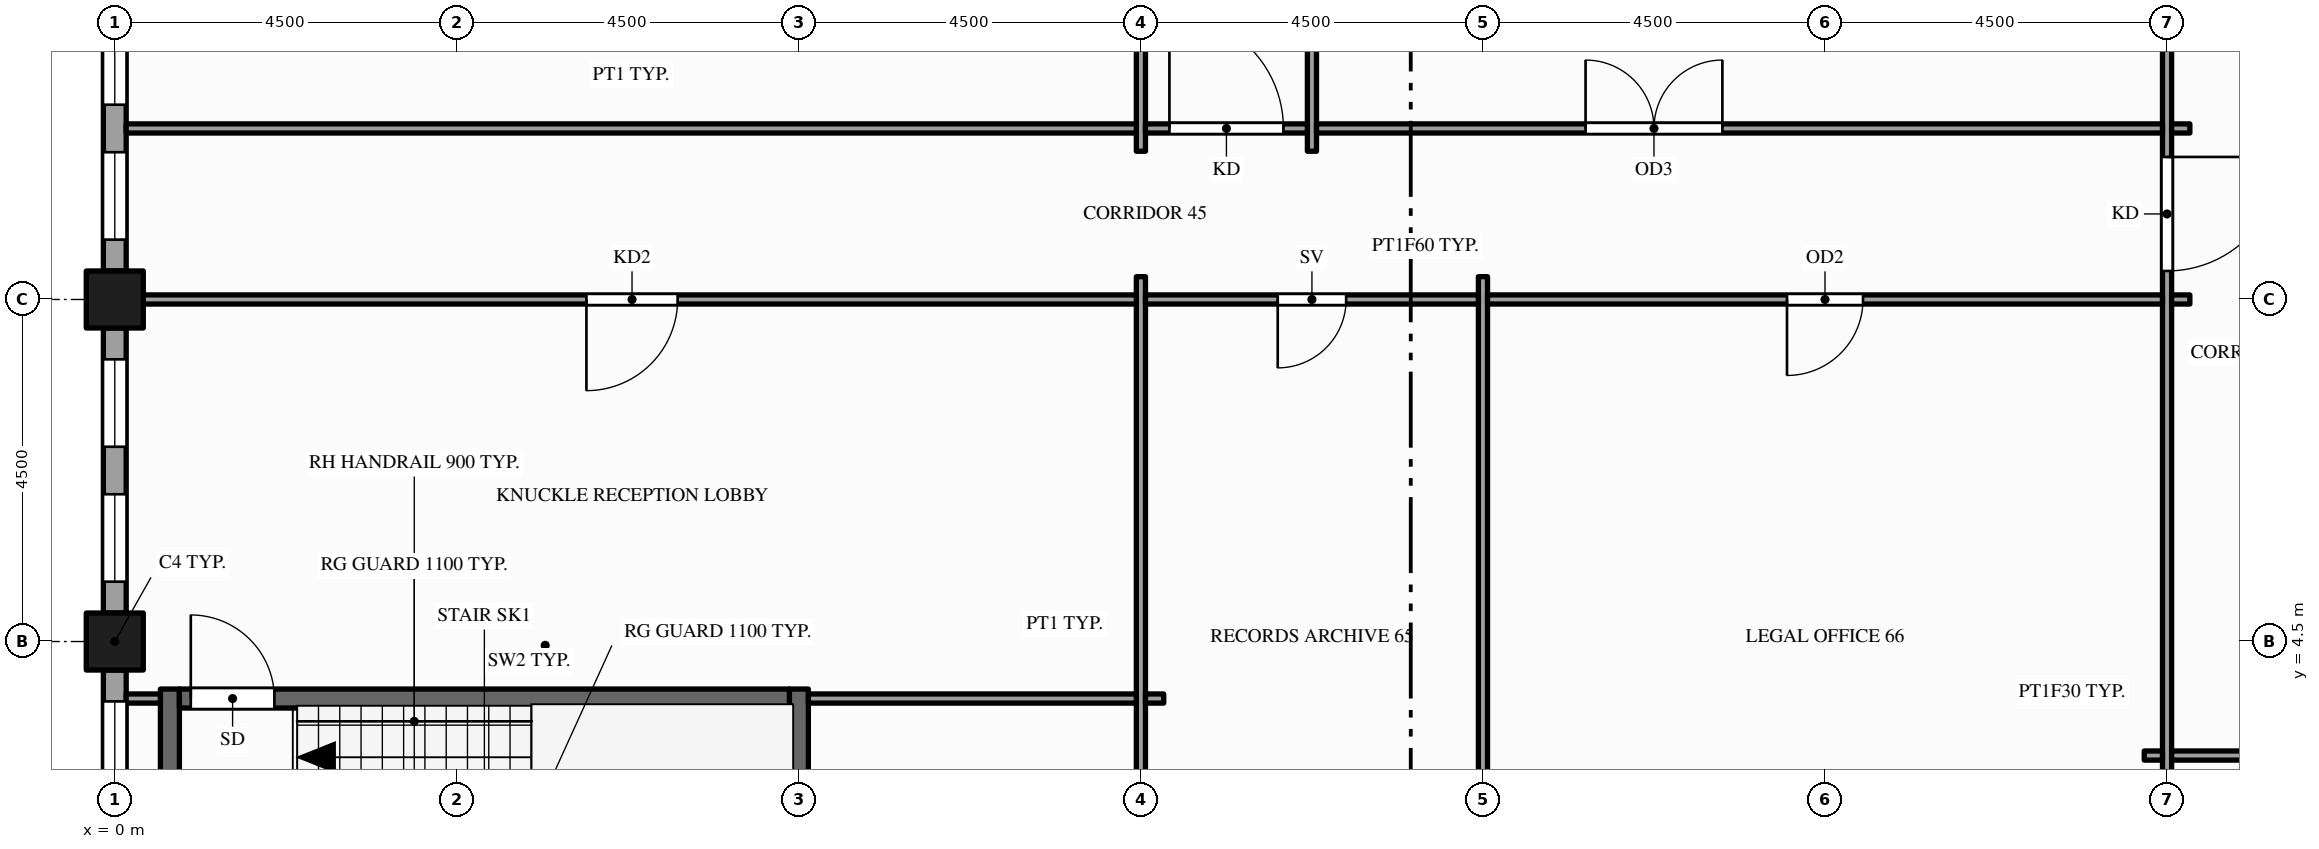
"""IFC4 building model, lengths in metres.
Left out: names, types, materials, properties, quantities, classifications, styles, units other than length and angle.
Written with IfcOpenShell. Run it as: python <this file> out.ifc"""

import sys

from ifc_helpers import new_model, si_unit, direction, frame, frame_2d, origin, origin_2d, place, context, subcontext, project, spatial, rectangle, hollow_rectangle, extrude, element, fill, save


model = new_model("IFC4")
c1 = context("Model", 3, precision=1e-05, world=origin(), true_north=direction((0.0, 1.0)))
c2 = subcontext(c1, "Body", "Model", "MODEL_VIEW")
j1 = project(units=[si_unit("LENGTHUNIT", "METRE"), si_unit("PLANEANGLEUNIT", "RADIAN")], contexts=[c1])
p1 = place(None, origin())
s1 = spatial("IfcSite", under=j1, at=p1, CompositionType="ELEMENT")
p2 = place(p1, origin())
s2 = spatial("IfcBuilding", under=s1, at=p2, CompositionType="ELEMENT")
p3 = place(p2, frame((0.0, 0.0, 227.0)))
s3 = spatial("IfcBuildingStorey", under=s2, at=p3, CompositionType="ELEMENT", Elevation=227.0)
for number, where, z_axis, x_axis in (
    (1, (0.0, 4.5, -0.15), (0.0, 0.0, 1.0), (1.0, 0.0, 0.0)),
    (2, (0.0, 9.0, -0.15), (0.0, 0.0, 1.0), (1.0, 0.0, 0.0)),
):
    element("IfcColumn", number, at=place(p3, frame(where, z_axis=z_axis, x_axis=x_axis)), inside=s3, PredefinedType="COLUMN", context=c2, shape_type="SweptSolid", body=[
        extrude(hollow_rectangle(XDim=0.75, YDim=0.75, WallThickness=0.036, at=origin_2d()), origin(), (0.0, 0.0, 1.0), 4.0),
    ])
p4 = place(p3, frame((0.0, 13.125, 0.0), z_axis=(0.0, 0.0, 1.0), x_axis=(0.0, -1.0, 0.0)))
e3 = element("IfcWall", 3, at=p4, inside=s3, PredefinedType="STANDARD", context=c2, shape_type="SweptSolid", body=[
    extrude(rectangle(XDim=3.75, YDim=0.3, at=frame_2d((1.875, 0.0))), origin(), (0.0, 0.0, 1.0), 3.157),
])
p5 = place(p4, frame((0.413, 0.0, 0.9)))
e4 = element("IfcOpeningElement", 4, at=p5, cuts=e3, PredefinedType="OPENING", context=c2, shape_type="SweptSolid", body=[
    extrude(rectangle(XDim=1.15, YDim=2.0, at=frame_2d((0.575, 1.0))), frame((0.0, 0.16, 0.0), z_axis=(0.0, -1.0, 0.0), x_axis=(1.0, 0.0, 0.0)), (0.0, 0.0, 1.0), 0.32),
])
p6 = place(p4, frame((2.188, 0.0, 0.9)))
e5 = element("IfcOpeningElement", 5, at=p6, cuts=e3, PredefinedType="OPENING", context=c2, shape_type="SweptSolid", body=[
    extrude(rectangle(XDim=1.15, YDim=2.0, at=frame_2d((0.575, 1.0))), frame((0.0, 0.16, 0.0), z_axis=(0.0, -1.0, 0.0), x_axis=(1.0, 0.0, 0.0)), (0.0, 0.0, 1.0), 0.32),
])
p7 = place(p3, frame((0.0, 8.625, 0.0), z_axis=(0.0, 0.0, 1.0), x_axis=(0.0, -1.0, 0.0)))
e6 = element("IfcWall", 6, at=p7, inside=s3, PredefinedType="STANDARD", context=c2, shape_type="SweptSolid", body=[
    extrude(rectangle(XDim=3.75, YDim=0.3, at=frame_2d((1.875, 0.0))), origin(), (0.0, 0.0, 1.0), 3.157),
])
p8 = place(p7, frame((0.413, 0.0, 0.9)))
e7 = element("IfcOpeningElement", 7, at=p8, cuts=e6, PredefinedType="OPENING", context=c2, shape_type="SweptSolid", body=[
    extrude(rectangle(XDim=1.15, YDim=2.0, at=frame_2d((0.575, 1.0))), frame((0.0, 0.16, 0.0), z_axis=(0.0, -1.0, 0.0), x_axis=(1.0, 0.0, 0.0)), (0.0, 0.0, 1.0), 0.32),
])
p9 = place(p7, frame((2.188, 0.0, 0.9)))
e8 = element("IfcOpeningElement", 8, at=p9, cuts=e6, PredefinedType="OPENING", context=c2, shape_type="SweptSolid", body=[
    extrude(rectangle(XDim=1.15, YDim=2.0, at=frame_2d((0.575, 1.0))), frame((0.0, 0.16, 0.0), z_axis=(0.0, -1.0, 0.0), x_axis=(1.0, 0.0, 0.0)), (0.0, 0.0, 1.0), 0.32),
])
p10 = place(p3, frame((0.0, 4.125, 0.0), z_axis=(0.0, 0.0, 1.0), x_axis=(0.0, -1.0, 0.0)))
e9 = element("IfcWall", 9, at=p10, inside=s3, PredefinedType="STANDARD", context=c2, shape_type="SweptSolid", body=[
    extrude(rectangle(XDim=3.75, YDim=0.3, at=frame_2d((1.875, 0.0))), origin(), (0.0, 0.0, 1.0), 3.157),
])
p11 = place(p10, frame((0.413, 0.0, 0.9)))
e10 = element("IfcOpeningElement", 10, at=p11, cuts=e9, PredefinedType="OPENING", context=c2, shape_type="SweptSolid", body=[
    extrude(rectangle(XDim=1.15, YDim=2.0, at=frame_2d((0.575, 1.0))), frame((0.0, 0.16, 0.0), z_axis=(0.0, -1.0, 0.0), x_axis=(1.0, 0.0, 0.0)), (0.0, 0.0, 1.0), 0.32),
])
p12 = place(p10, frame((2.188, 0.0, 0.9)))
e11 = element("IfcOpeningElement", 11, at=p12, cuts=e9, PredefinedType="OPENING", context=c2, shape_type="SweptSolid", body=[
    extrude(rectangle(XDim=1.15, YDim=2.0, at=frame_2d((0.575, 1.0))), frame((0.0, 0.16, 0.0), z_axis=(0.0, -1.0, 0.0), x_axis=(1.0, 0.0, 0.0)), (0.0, 0.0, 1.0), 0.32),
])
p13 = place(p3, frame((0.725, 0.6, 0.0), z_axis=(0.0, 0.0, 1.0), x_axis=(0.0, 1.0, 0.0)))
e12 = element("IfcWall", 12, at=p13, inside=s3, PredefinedType="SHEAR", context=c2, shape_type="SweptSolid", body=[
    extrude(rectangle(XDim=3.275, YDim=0.25, at=frame_2d((1.637, 0.0))), origin(), (0.0, 0.0, 1.0), 3.85),
])
p14 = place(p3, frame((9.0, 0.375, 0.0), z_axis=(0.0, 0.0, 1.0), x_axis=(0.0, 1.0, 0.0)))
e13 = element("IfcWall", 13, at=p14, inside=s3, PredefinedType="SHEAR", context=c2, shape_type="SweptSolid", body=[
    extrude(rectangle(XDim=3.5, YDim=0.25, at=frame_2d((1.75, 0.0))), origin(), (0.0, 0.0, 1.0), 3.85),
])
p15 = place(p3, frame((13.5, 0.15, 0.0), z_axis=(0.0, 0.0, 1.0), x_axis=(0.0, 1.0, 0.0)))
e14 = element("IfcWall", 14, at=p15, inside=s3, PredefinedType="PARTITIONING", context=c2, shape_type="SweptSolid", body=[
    extrude(rectangle(XDim=9.15, YDim=0.12, at=frame_2d((4.575, 0.0))), origin(), (0.0, 0.0, 1.0), 2.87),
])
p16 = place(p3, frame((13.5, 10.95, 0.0), z_axis=(0.0, 0.0, 1.0), x_axis=(0.0, 1.0, 0.0)))
e15 = element("IfcWall", 15, at=p16, inside=s3, PredefinedType="PARTITIONING", context=c2, shape_type="SweptSolid", body=[
    extrude(rectangle(XDim=20.85, YDim=0.12, at=frame_2d((10.425, 0.0))), origin(), (0.0, 0.0, 1.0), 2.6),
])
p17 = place(p16, frame((3.175, 0.0, 0.0)))
e16 = element("IfcOpeningElement", 16, at=p17, cuts=e15, PredefinedType="OPENING", context=c2, shape_type="SweptSolid", body=[
    extrude(rectangle(XDim=1.0, YDim=2.1, at=frame_2d((0.5, 1.05))), frame((0.0, 0.07, 0.0), z_axis=(0.0, -1.0, 0.0), x_axis=(1.0, 0.0, 0.0)), (0.0, 0.0, 1.0), 0.14),
])
p18 = place(p16, frame((11.08, 0.0, 0.0)))
e17 = element("IfcOpeningElement", 17, at=p18, cuts=e15, PredefinedType="OPENING", context=c2, shape_type="SweptSolid", body=[
    extrude(rectangle(XDim=1.0, YDim=2.1, at=frame_2d((0.5, 1.05))), frame((0.0, 0.07, 0.0), z_axis=(0.0, -1.0, 0.0), x_axis=(1.0, 0.0, 0.0)), (0.0, 0.0, 1.0), 0.14),
])
p19 = place(p3, frame((15.75, 10.95, 0.0), z_axis=(0.0, 0.0, 1.0), x_axis=(0.0, 1.0, 0.0)))
e18 = element("IfcWall", 18, at=p19, inside=s3, PredefinedType="PARTITIONING", context=c2, shape_type="SweptSolid", body=[
    extrude(rectangle(XDim=20.85, YDim=0.12, at=frame_2d((10.425, 0.0))), origin(), (0.0, 0.0, 1.0), 2.6),
])
p20 = place(p19, frame((17.8, 0.0, 0.0)))
e19 = element("IfcOpeningElement", 19, at=p20, cuts=e18, PredefinedType="OPENING", context=c2, shape_type="SweptSolid", body=[
    extrude(rectangle(XDim=1.0, YDim=2.1, at=frame_2d((0.5, 1.05))), frame((0.0, 0.07, 0.0), z_axis=(0.0, -1.0, 0.0), x_axis=(1.0, 0.0, 0.0)), (0.0, 0.0, 1.0), 0.14),
])
p21 = place(p19, frame((4.2, 0.0, 0.0)))
e20 = element("IfcOpeningElement", 20, at=p21, cuts=e18, PredefinedType="OPENING", context=c2, shape_type="SweptSolid", body=[
    extrude(rectangle(XDim=1.2, YDim=2.1, at=frame_2d((0.6, 1.05))), frame((0.0, 0.07, 0.0), z_axis=(0.0, -1.0, 0.0), x_axis=(1.0, 0.0, 0.0)), (0.0, 0.0, 1.0), 0.14),
])
p22 = place(p3, frame((18.0, 0.15, 0.0), z_axis=(0.0, 0.0, 1.0), x_axis=(0.0, 1.0, 0.0)))
e21 = element("IfcWall", 21, at=p22, inside=s3, PredefinedType="PARTITIONING", context=c2, shape_type="SweptSolid", body=[
    extrude(rectangle(XDim=9.15, YDim=0.12, at=frame_2d((4.575, 0.0))), origin(), (0.0, 0.0, 1.0), 2.87),
])
p23 = place(p3, frame((27.0, -1.35, 0.0), z_axis=(0.0, 0.0, 1.0), x_axis=(0.0, 1.0, 0.0)))
e22 = element("IfcWall", 22, at=p23, inside=s3, PredefinedType="PARTITIONING", context=c2, shape_type="SweptSolid", body=[
    extrude(rectangle(XDim=22.48, YDim=0.12, at=frame_2d((11.24, 0.0))), origin(), (0.0, 0.0, 1.0), 2.87),
])
p24 = place(p23, frame((10.725, 0.0, 0.0)))
e23 = element("IfcOpeningElement", 23, at=p24, cuts=e22, PredefinedType="OPENING", context=c2, shape_type="SweptSolid", body=[
    extrude(rectangle(XDim=1.5, YDim=2.1, at=frame_2d((0.75, 1.05))), frame((0.0, 0.07, 0.0), z_axis=(0.0, -1.0, 0.0), x_axis=(1.0, 0.0, 0.0)), (0.0, 0.0, 1.0), 0.14),
])
p25 = place(p23, frame((14.625, 0.0, 0.0)))
e24 = element("IfcOpeningElement", 24, at=p25, cuts=e22, PredefinedType="OPENING", context=c2, shape_type="SweptSolid", body=[
    extrude(rectangle(XDim=1.2, YDim=2.1, at=frame_2d((0.6, 1.05))), frame((0.0, 0.07, 0.0), z_axis=(0.0, -1.0, 0.0), x_axis=(1.0, 0.0, 0.0)), (0.0, 0.0, 1.0), 0.14),
])
p26 = place(p3, frame((26.7, 3.0, 0.0), z_axis=(0.0, 0.0, 1.0), x_axis=(1.0, 0.0, 0.0)))
e25 = element("IfcWall", 25, at=p26, inside=s3, PredefinedType="PARTITIONING", context=c2, shape_type="SweptSolid", body=[
    extrude(rectangle(XDim=0.24, YDim=0.12, at=frame_2d((0.12, 0.0))), origin(), (0.0, 0.0, 1.0), 2.87),
])
p27 = place(p3, frame((27.06, 3.0, 0.0), z_axis=(0.0, 0.0, 1.0), x_axis=(1.0, 0.0, 0.0)))
e26 = element("IfcWall", 26, at=p27, inside=s3, PredefinedType="PARTITIONING", context=c2, shape_type="SweptSolid", body=[
    extrude(rectangle(XDim=2.13, YDim=0.12, at=frame_2d((1.065, 0.0))), origin(), (0.0, 0.0, 1.0), 2.87),
])
p28 = place(p3, frame((0.15, 3.75, 0.0), z_axis=(0.0, 0.0, 1.0), x_axis=(1.0, 0.0, 0.0)))
e27 = element("IfcWall", 27, at=p28, inside=s3, PredefinedType="PARTITIONING", context=c2, shape_type="SweptSolid", body=[
    extrude(rectangle(XDim=0.45, YDim=0.12, at=frame_2d((0.225, 0.0))), origin(), (0.0, 0.0, 1.0), 3.85),
])
p29 = place(p3, frame((0.85, 3.75, 0.0), z_axis=(0.0, 0.0, 1.0), x_axis=(1.0, 0.0, 0.0)))
e28 = element("IfcWall", 28, at=p29, inside=s3, PredefinedType="SHEAR", context=c2, shape_type="SweptSolid", body=[
    extrude(rectangle(XDim=8.025, YDim=0.25, at=frame_2d((4.012, 0.0))), origin(), (0.0, 0.0, 1.0), 3.85),
])
p30 = place(p29, frame((0.15, 0.0, 0.0)))
e29 = element("IfcOpeningElement", 29, at=p30, cuts=e28, PredefinedType="OPENING", context=c2, shape_type="SweptSolid", body=[
    extrude(rectangle(XDim=1.1, YDim=2.1, at=frame_2d((0.55, 1.05))), frame((0.0, 0.135, 0.0), z_axis=(0.0, -1.0, 0.0), x_axis=(1.0, 0.0, 0.0)), (0.0, 0.0, 1.0), 0.27),
])
p31 = place(p3, frame((9.125, 3.75, 0.0), z_axis=(0.0, 0.0, 1.0), x_axis=(1.0, 0.0, 0.0)))
e30 = element("IfcWall", 30, at=p31, inside=s3, PredefinedType="PARTITIONING", context=c2, shape_type="SweptSolid", body=[
    extrude(rectangle(XDim=4.315, YDim=0.12, at=frame_2d((2.157, 0.0))), origin(), (0.0, 0.0, 1.0), 2.87),
])
p32 = place(p3, frame((13.56, 3.75, 0.0), z_axis=(0.0, 0.0, 1.0), x_axis=(1.0, 0.0, 0.0)))
e31 = element("IfcWall", 31, at=p32, inside=s3, PredefinedType="PARTITIONING", context=c2, shape_type="SweptSolid", body=[
    extrude(rectangle(XDim=0.24, YDim=0.12, at=frame_2d((0.12, 0.0))), origin(), (0.0, 0.0, 1.0), 2.87),
])
p33 = place(p3, frame((0.15, 9.0, 0.0), z_axis=(0.0, 0.0, 1.0), x_axis=(1.0, 0.0, 0.0)))
e32 = element("IfcWall", 32, at=p33, inside=s3, PredefinedType="PARTITIONING", context=c2, shape_type="SweptSolid", body=[
    extrude(rectangle(XDim=13.29, YDim=0.12, at=frame_2d((6.645, 0.0))), origin(), (0.0, 0.0, 1.0), 2.87),
])
p34 = place(p33, frame((6.055, 0.0, 0.0)))
e33 = element("IfcOpeningElement", 33, at=p34, cuts=e32, PredefinedType="OPENING", context=c2, shape_type="SweptSolid", body=[
    extrude(rectangle(XDim=1.2, YDim=2.1, at=frame_2d((0.6, 1.05))), frame((0.0, 0.07, 0.0), z_axis=(0.0, -1.0, 0.0), x_axis=(1.0, 0.0, 0.0)), (0.0, 0.0, 1.0), 0.14),
])
p35 = place(p3, frame((13.56, 9.0, 0.0), z_axis=(0.0, 0.0, 1.0), x_axis=(1.0, 0.0, 0.0)))
e34 = element("IfcWall", 34, at=p35, inside=s3, PredefinedType="PARTITIONING", context=c2, shape_type="SweptSolid", body=[
    extrude(rectangle(XDim=4.38, YDim=0.12, at=frame_2d((2.19, 0.0))), origin(), (0.0, 0.0, 1.0), 2.87),
])
p36 = place(p35, frame((1.74, 0.0, 0.0)))
e35 = element("IfcOpeningElement", 35, at=p36, cuts=e34, PredefinedType="OPENING", context=c2, shape_type="SweptSolid", body=[
    extrude(rectangle(XDim=0.9, YDim=2.1, at=frame_2d((0.45, 1.05))), frame((0.0, 0.07, 0.0), z_axis=(0.0, -1.0, 0.0), x_axis=(1.0, 0.0, 0.0)), (0.0, 0.0, 1.0), 0.14),
])
p37 = place(p3, frame((18.06, 9.0, 0.0), z_axis=(0.0, 0.0, 1.0), x_axis=(1.0, 0.0, 0.0)))
e36 = element("IfcWall", 36, at=p37, inside=s3, PredefinedType="PARTITIONING", context=c2, shape_type="SweptSolid", body=[
    extrude(rectangle(XDim=8.88, YDim=0.12, at=frame_2d((4.44, 0.0))), origin(), (0.0, 0.0, 1.0), 2.76),
])
p38 = place(p37, frame((3.94, 0.0, 0.0)))
e37 = element("IfcOpeningElement", 37, at=p38, cuts=e36, PredefinedType="OPENING", context=c2, shape_type="SweptSolid", body=[
    extrude(rectangle(XDim=1.0, YDim=2.1, at=frame_2d((0.5, 1.05))), frame((0.0, 0.07, 0.0), z_axis=(0.0, -1.0, 0.0), x_axis=(1.0, 0.0, 0.0)), (0.0, 0.0, 1.0), 0.14),
])
p39 = place(p3, frame((27.06, 9.0, 0.0), z_axis=(0.0, 0.0, 1.0), x_axis=(1.0, 0.0, 0.0)))
e38 = element("IfcWall", 38, at=p39, inside=s3, PredefinedType="PARTITIONING", context=c2, shape_type="SweptSolid", body=[
    extrude(rectangle(XDim=0.24, YDim=0.12, at=frame_2d((0.12, 0.0))), origin(), (0.0, 0.0, 1.0), 2.87),
])
p40 = place(p3, frame((0.15, 11.25, 0.0), z_axis=(0.0, 0.0, 1.0), x_axis=(1.0, 0.0, 0.0)))
e39 = element("IfcWall", 39, at=p40, inside=s3, PredefinedType="PARTITIONING", context=c2, shape_type="SweptSolid", body=[
    extrude(rectangle(XDim=13.29, YDim=0.12, at=frame_2d((6.645, 0.0))), origin(), (0.0, 0.0, 1.0), 2.87),
])
p41 = place(p3, frame((13.56, 11.25, 0.0), z_axis=(0.0, 0.0, 1.0), x_axis=(1.0, 0.0, 0.0)))
e40 = element("IfcWall", 40, at=p41, inside=s3, PredefinedType="PARTITIONING", context=c2, shape_type="SweptSolid", body=[
    extrude(rectangle(XDim=2.13, YDim=0.12, at=frame_2d((1.065, 0.0))), origin(), (0.0, 0.0, 1.0), 2.87),
])
p42 = place(p41, frame((0.315, 0.0, 0.0)))
e41 = element("IfcOpeningElement", 41, at=p42, cuts=e40, PredefinedType="OPENING", context=c2, shape_type="SweptSolid", body=[
    extrude(rectangle(XDim=1.5, YDim=2.1, at=frame_2d((0.75, 1.05))), frame((0.0, 0.07, 0.0), z_axis=(0.0, -1.0, 0.0), x_axis=(1.0, 0.0, 0.0)), (0.0, 0.0, 1.0), 0.14),
])
p43 = place(p3, frame((15.81, 11.25, 0.0), z_axis=(0.0, 0.0, 1.0), x_axis=(1.0, 0.0, 0.0)))
e42 = element("IfcWall", 42, at=p43, inside=s3, PredefinedType="PARTITIONING", context=c2, shape_type="SweptSolid", body=[
    extrude(rectangle(XDim=11.13, YDim=0.12, at=frame_2d((5.565, 0.0))), origin(), (0.0, 0.0, 1.0), 2.76),
])
p44 = place(p43, frame((3.54, 0.0, 0.0)))
e43 = element("IfcOpeningElement", 43, at=p44, cuts=e42, PredefinedType="OPENING", context=c2, shape_type="SweptSolid", body=[
    extrude(rectangle(XDim=1.8, YDim=2.1, at=frame_2d((0.9, 1.05))), frame((0.0, 0.07, 0.0), z_axis=(0.0, -1.0, 0.0), x_axis=(1.0, 0.0, 0.0)), (0.0, 0.0, 1.0), 0.14),
])
p45 = place(p3, frame((27.06, 11.25, 0.0), z_axis=(0.0, 0.0, 1.0), x_axis=(1.0, 0.0, 0.0)))
e44 = element("IfcWall", 44, at=p45, inside=s3, PredefinedType="PARTITIONING", context=c2, shape_type="SweptSolid", body=[
    extrude(rectangle(XDim=0.24, YDim=0.12, at=frame_2d((0.12, 0.0))), origin(), (0.0, 0.0, 1.0), 2.87),
])
p46 = place(p5, origin())
e45 = element("IfcWindow", 45, at=p46, inside=s3, PartitioningType="SINGLE_PANEL", PredefinedType="WINDOW", context=c2, shape_type="SweptSolid", body=[
    extrude(rectangle(XDim=1.15, YDim=2.0, at=frame_2d((0.575, 1.0))), frame((0.0, 0.03, 0.0), z_axis=(0.0, -1.0, 0.0), x_axis=(1.0, 0.0, 0.0)), (0.0, 0.0, 1.0), 0.06),
])
fill(e4, e45)
p47 = place(p6, origin())
e46 = element("IfcWindow", 46, at=p47, inside=s3, PartitioningType="SINGLE_PANEL", PredefinedType="WINDOW", context=c2, shape_type="SweptSolid", body=[
    extrude(rectangle(XDim=1.15, YDim=2.0, at=frame_2d((0.575, 1.0))), frame((0.0, 0.03, 0.0), z_axis=(0.0, -1.0, 0.0), x_axis=(1.0, 0.0, 0.0)), (0.0, 0.0, 1.0), 0.06),
])
fill(e5, e46)
p48 = place(p8, origin())
e47 = element("IfcWindow", 47, at=p48, inside=s3, PartitioningType="SINGLE_PANEL", PredefinedType="WINDOW", context=c2, shape_type="SweptSolid", body=[
    extrude(rectangle(XDim=1.15, YDim=2.0, at=frame_2d((0.575, 1.0))), frame((0.0, 0.03, 0.0), z_axis=(0.0, -1.0, 0.0), x_axis=(1.0, 0.0, 0.0)), (0.0, 0.0, 1.0), 0.06),
])
fill(e7, e47)
p49 = place(p9, origin())
e48 = element("IfcWindow", 48, at=p49, inside=s3, PartitioningType="SINGLE_PANEL", PredefinedType="WINDOW", context=c2, shape_type="SweptSolid", body=[
    extrude(rectangle(XDim=1.15, YDim=2.0, at=frame_2d((0.575, 1.0))), frame((0.0, 0.03, 0.0), z_axis=(0.0, -1.0, 0.0), x_axis=(1.0, 0.0, 0.0)), (0.0, 0.0, 1.0), 0.06),
])
fill(e8, e48)
p50 = place(p11, origin())
e49 = element("IfcWindow", 49, at=p50, inside=s3, PartitioningType="SINGLE_PANEL", PredefinedType="WINDOW", context=c2, shape_type="SweptSolid", body=[
    extrude(rectangle(XDim=1.15, YDim=2.0, at=frame_2d((0.575, 1.0))), frame((0.0, 0.03, 0.0), z_axis=(0.0, -1.0, 0.0), x_axis=(1.0, 0.0, 0.0)), (0.0, 0.0, 1.0), 0.06),
])
fill(e10, e49)
p51 = place(p24, origin())
e50 = element("IfcDoor", 50, at=p51, inside=s3, OperationType="SINGLE_SWING_RIGHT", PredefinedType="DOOR", context=c2, shape_type="SweptSolid", body=[
    extrude(rectangle(XDim=1.5, YDim=2.1, at=frame_2d((0.75, 1.05))), frame((0.0, 0.025, 0.0), z_axis=(0.0, -1.0, 0.0), x_axis=(1.0, 0.0, 0.0)), (0.0, 0.0, 1.0), 0.05),
])
fill(e23, e50)
p52 = place(p30, origin())
e51 = element("IfcDoor", 51, at=p52, inside=s3, OperationType="SINGLE_SWING_LEFT", PredefinedType="DOOR", context=c2, shape_type="SweptSolid", body=[
    extrude(rectangle(XDim=1.1, YDim=2.1, at=frame_2d((0.55, 1.05))), frame((0.0, 0.025, 0.0), z_axis=(0.0, -1.0, 0.0), x_axis=(1.0, 0.0, 0.0)), (0.0, 0.0, 1.0), 0.05),
])
fill(e29, e51)
p53 = place(p34, origin())
e52 = element("IfcDoor", 52, at=p53, inside=s3, OperationType="SINGLE_SWING_LEFT", PredefinedType="DOOR", context=c2, shape_type="SweptSolid", body=[
    extrude(rectangle(XDim=1.2, YDim=2.1, at=frame_2d((0.6, 1.05))), frame((0.0, 0.025, 0.0), z_axis=(0.0, -1.0, 0.0), x_axis=(1.0, 0.0, 0.0)), (0.0, 0.0, 1.0), 0.05),
])
fill(e33, e52)
p54 = place(p36, origin())
e53 = element("IfcDoor", 53, at=p54, inside=s3, OperationType="SINGLE_SWING_LEFT", PredefinedType="DOOR", context=c2, shape_type="SweptSolid", body=[
    extrude(rectangle(XDim=0.9, YDim=2.1, at=frame_2d((0.45, 1.05))), frame((0.0, 0.025, 0.0), z_axis=(0.0, -1.0, 0.0), x_axis=(1.0, 0.0, 0.0)), (0.0, 0.0, 1.0), 0.05),
])
fill(e35, e53)
p55 = place(p38, origin())
e54 = element("IfcDoor", 54, at=p55, inside=s3, OperationType="SINGLE_SWING_LEFT", PredefinedType="DOOR", context=c2, shape_type="SweptSolid", body=[
    extrude(rectangle(XDim=1.0, YDim=2.1, at=frame_2d((0.5, 1.05))), frame((0.0, 0.025, 0.0), z_axis=(0.0, -1.0, 0.0), x_axis=(1.0, 0.0, 0.0)), (0.0, 0.0, 1.0), 0.05),
])
fill(e37, e54)
p56 = place(p44, origin())
e55 = element("IfcDoor", 55, at=p56, inside=s3, OperationType="DOUBLE_DOOR_SINGLE_SWING", PredefinedType="DOOR", context=c2, shape_type="SweptSolid", body=[
    extrude(rectangle(XDim=1.8, YDim=2.1, at=frame_2d((0.9, 1.05))), frame((0.0, 0.025, 0.0), z_axis=(0.0, -1.0, 0.0), x_axis=(1.0, 0.0, 0.0)), (0.0, 0.0, 1.0), 0.05),
])
fill(e43, e55)
p57 = place(p42, origin())
e56 = element("IfcDoor", 56, at=p57, inside=s3, OperationType="SINGLE_SWING_LEFT", PredefinedType="DOOR", context=c2, shape_type="SweptSolid", body=[
    extrude(rectangle(XDim=1.5, YDim=2.1, at=frame_2d((0.75, 1.05))), frame((0.0, 0.025, 0.0), z_axis=(0.0, -1.0, 0.0), x_axis=(1.0, 0.0, 0.0)), (0.0, 0.0, 1.0), 0.05),
])
fill(e41, e56)
save(model, sys.argv[1])
